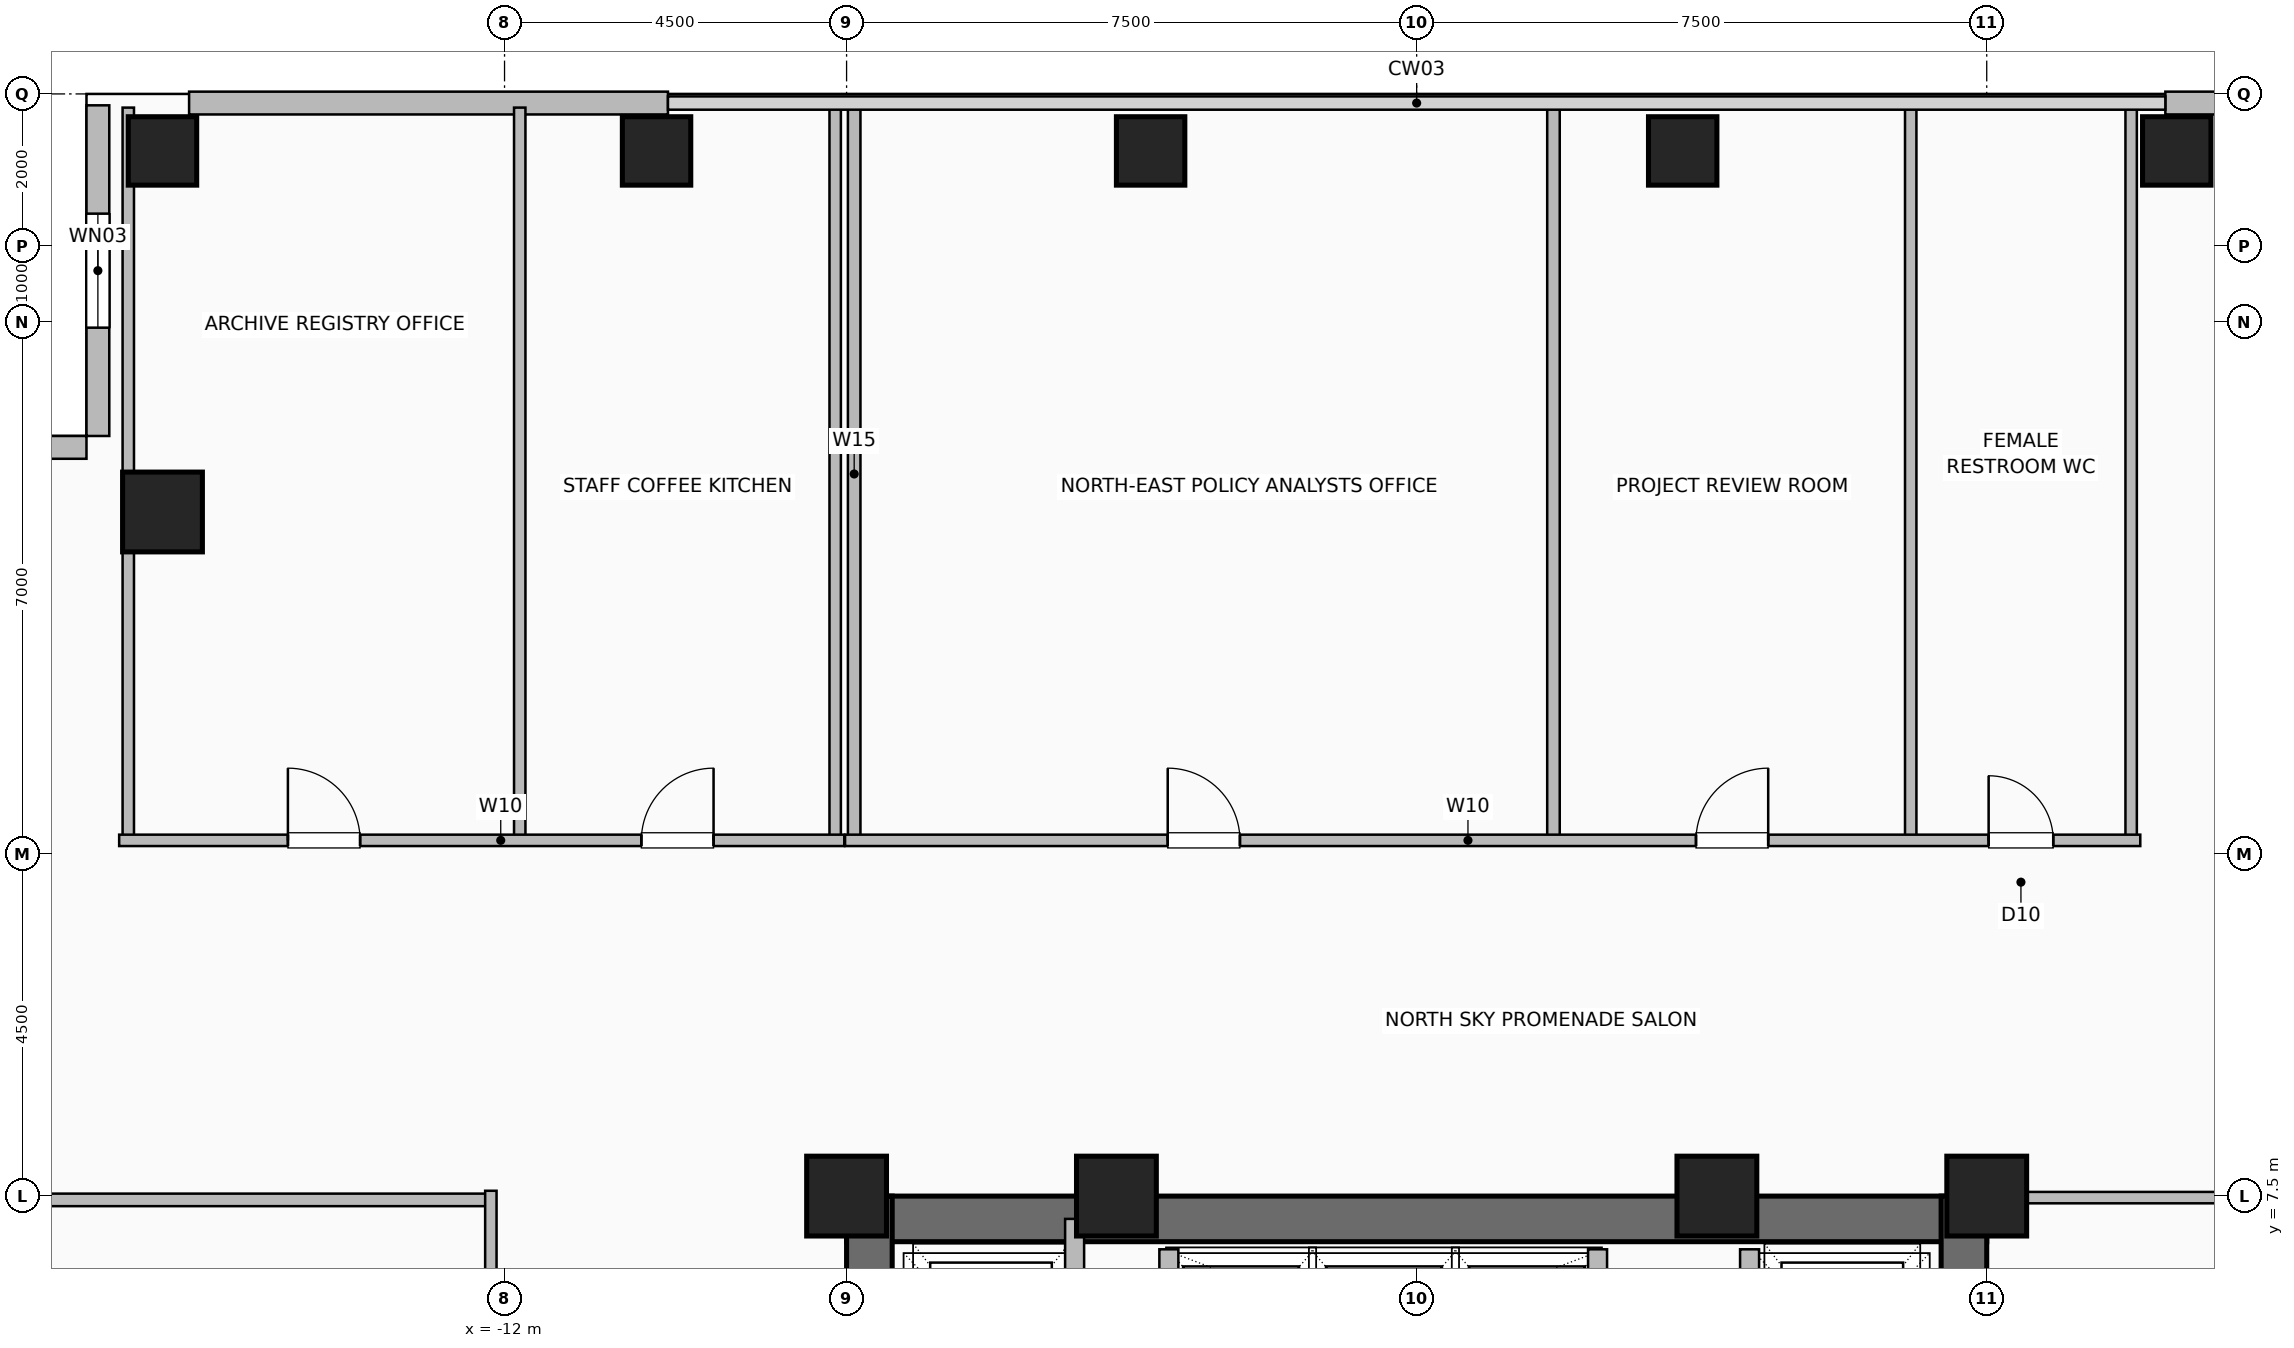
"""IFC4 building model, lengths in metres.
Left out: names, types, materials, properties, quantities, classifications, styles, units other than length and angle.
Written with IfcOpenShell. Run it as: python <this file> out.ifc"""

import sys

from ifc_helpers import new_model, si_unit, direction, frame, frame_2d, origin, origin_2d, place, context, subcontext, project, spatial, rectangle, hollow_rectangle, extrude, element, fill, save


model = new_model("IFC4")
c1 = context("Model", 3, precision=1e-05, world=origin(), true_north=direction((0.0, 1.0)))
c2 = subcontext(c1, "Body", "Model", "MODEL_VIEW")
j1 = project(units=[si_unit("LENGTHUNIT", "METRE"), si_unit("PLANEANGLEUNIT", "RADIAN")], contexts=[c1])
p1 = place(None, origin())
s1 = spatial("IfcSite", under=j1, at=p1, CompositionType="ELEMENT")
p2 = place(p1, origin())
s2 = spatial("IfcBuilding", under=s1, at=p2, CompositionType="ELEMENT")
p3 = place(p2, frame((0.0, 0.0, 112.0)))
s3 = spatial("IfcBuildingStorey", under=s2, at=p3, CompositionType="ELEMENT", Elevation=112.0)
for number, where, z_axis, x_axis in (
    (1, (7.5, 7.5, 0.0), (0.0, 0.0, 1.0), (1.0, 0.0, 0.0)),
    (2, (3.95, 7.5, 0.0), (0.0, 0.0, 1.0), (1.0, 0.0, 0.0)),
    (3, (-3.95, 7.5, 0.0), (0.0, 0.0, 1.0), (1.0, 0.0, 0.0)),
    (4, (-7.5, 7.5, 0.0), (0.0, 0.0, 1.0), (1.0, 0.0, 0.0)),
):
    element("IfcColumn", number, at=place(p3, frame(where, z_axis=z_axis, x_axis=x_axis)), inside=s3, PredefinedType="COLUMN", context=c2, shape_type="SweptSolid", body=[
        extrude(hollow_rectangle(XDim=1.05, YDim=1.05, WallThickness=0.05, at=origin_2d()), origin(), (0.0, 0.0, 1.0), 3.6),
    ])
for number, where, z_axis, x_axis in (
    (5, (-16.5, 21.25, 0.0), (0.0, 0.0, 1.0), (1.0, 0.0, 0.0)),
    (6, (-10.0, 21.25, 0.0), (0.0, 0.0, 1.0), (1.0, 0.0, 0.0)),
    (7, (-3.5, 21.25, 0.0), (0.0, 0.0, 1.0), (1.0, 0.0, 0.0)),
    (8, (3.5, 21.25, 0.0), (0.0, 0.0, 1.0), (1.0, 0.0, 0.0)),
    (9, (10.0, 21.25, 0.0), (0.0, 0.0, 1.0), (1.0, 0.0, 0.0)),
):
    element("IfcColumn", number, at=place(p3, frame(where, z_axis=z_axis, x_axis=x_axis)), inside=s3, PredefinedType="COLUMN", context=c2, shape_type="SweptSolid", body=[
        extrude(hollow_rectangle(XDim=0.9, YDim=0.9, WallThickness=0.045, at=origin_2d()), origin(), (0.0, 0.0, 1.0), 3.6),
    ])
p4 = place(p3, frame((-16.5, 16.5, 0.0), z_axis=(0.0, 0.0, 1.0), x_axis=(1.0, 0.0, 0.0)))
e10 = element("IfcColumn", 10, at=p4, inside=s3, PredefinedType="COLUMN", context=c2, shape_type="SweptSolid", body=[
    extrude(hollow_rectangle(XDim=1.05, YDim=1.05, WallThickness=0.05, at=origin_2d()), origin(), (0.0, 0.0, 1.0), 3.6),
])
for number, where, z_axis, x_axis in (
    (11, (-16.15, 21.88, 0.0), (0.0, 0.0, 1.0), (1.0, 0.0, 0.0)),
    (12, (9.85, 21.88, 0.0), (0.0, 0.0, 1.0), (1.0, 0.0, 0.0)),
):
    element("IfcWall", number, at=place(p3, frame(where, z_axis=z_axis, x_axis=x_axis)), inside=s3, PredefinedType="SOLIDWALL", context=c2, shape_type="SweptSolid", body=[
        extrude(rectangle(XDim=6.3, YDim=0.3, at=frame_2d((3.15, 0.0))), origin(), (0.0, 0.0, 1.0), 3.36),
    ])
p5 = place(p3, frame((-17.35, 21.85, 0.0), z_axis=(0.0, 0.0, 1.0), x_axis=(0.0, -1.0, 0.0)))
e13 = element("IfcWall", 13, at=p5, inside=s3, PredefinedType="SOLIDWALL", context=c2, shape_type="SweptSolid", body=[
    extrude(rectangle(XDim=4.35, YDim=0.3, at=frame_2d((2.175, 0.0))), origin(), (0.0, 0.0, 1.0), 3.36),
])
p6 = place(p5, frame((1.425, 0.0, 0.9)))
e14 = element("IfcOpeningElement", 14, at=p6, cuts=e13, PredefinedType="OPENING", context=c2, shape_type="SweptSolid", body=[
    extrude(rectangle(XDim=1.5, YDim=1.8, at=frame_2d((0.75, 0.9))), frame((0.0, 0.16, 0.0), z_axis=(0.0, -1.0, 0.0), x_axis=(1.0, 0.0, 0.0)), (0.0, 0.0, 1.0), 0.32),
])
p7 = place(p3, frame((-21.85, 17.35, 0.0), z_axis=(0.0, 0.0, 1.0), x_axis=(1.0, 0.0, 0.0)))
e15 = element("IfcWall", 15, at=p7, inside=s3, PredefinedType="SOLIDWALL", context=c2, shape_type="SweptSolid", body=[
    extrude(rectangle(XDim=4.35, YDim=0.3, at=frame_2d((2.175, 0.0))), origin(), (0.0, 0.0, 1.0), 3.36),
])
p8 = place(p3, frame((-7.5, 7.2, 0.0), z_axis=(0.0, 0.0, 1.0), x_axis=(1.0, 0.0, 0.0)))
e16 = element("IfcWall", 16, at=p8, inside=s3, PredefinedType="SHEAR", context=c2, shape_type="SweptSolid", body=[
    extrude(rectangle(XDim=15.0, YDim=0.6, at=frame_2d((7.5, 0.0))), origin(), (0.0, 0.0, 1.0), 3.36),
])
p9 = place(p3, frame((-7.2, -7.5, 0.0), z_axis=(0.0, 0.0, 1.0), x_axis=(0.0, 1.0, 0.0)))
e17 = element("IfcWall", 17, at=p9, inside=s3, PredefinedType="SHEAR", context=c2, shape_type="SweptSolid", body=[
    extrude(rectangle(XDim=15.0, YDim=0.6, at=frame_2d((7.5, 0.0))), origin(), (0.0, 0.0, 1.0), 3.36),
])
p10 = place(p9, frame((9.5, 0.0, 0.0)))
e18 = element("IfcOpeningElement", 18, at=p10, cuts=e17, PredefinedType="OPENING", context=c2, shape_type="SweptSolid", body=[
    extrude(rectangle(XDim=1.0, YDim=2.08, at=frame_2d((0.5, 1.04))), frame((0.0, 0.31, 0.0), z_axis=(0.0, -1.0, 0.0), x_axis=(1.0, 0.0, 0.0)), (0.0, 0.0, 1.0), 0.62),
])
p11 = place(p3, frame((7.2, -7.5, 0.0), z_axis=(0.0, 0.0, 1.0), x_axis=(0.0, 1.0, 0.0)))
e19 = element("IfcWall", 19, at=p11, inside=s3, PredefinedType="SHEAR", context=c2, shape_type="SweptSolid", body=[
    extrude(rectangle(XDim=15.0, YDim=0.6, at=frame_2d((7.5, 0.0))), origin(), (0.0, 0.0, 1.0), 3.36),
])
for number, where, z_axis, x_axis in (
    (20, (-3.26, 4.58, 0.0), (0.0, 0.0, 1.0), (0.0, 1.0, 0.0)),
    (21, (2.38, 4.58, 0.0), (0.0, 0.0, 1.0), (0.0, 1.0, 0.0)),
):
    element("IfcWall", number, at=place(p3, frame(where, z_axis=z_axis, x_axis=x_axis)), inside=s3, PredefinedType="SHEAR", context=c2, shape_type="SweptSolid", body=[
        extrude(rectangle(XDim=2.22, YDim=0.25, at=frame_2d((1.11, 0.0))), origin(), (0.0, 0.0, 1.0), 3.36),
    ])
p12 = place(p3, frame((-4.5, 4.35, 0.0), z_axis=(0.0, 0.0, 1.0), x_axis=(0.0, 1.0, 0.0)))
e22 = element("IfcWall", 22, at=p12, inside=s3, PredefinedType="SHEAR", context=c2, shape_type="SweptSolid", body=[
    extrude(rectangle(XDim=2.85, YDim=0.25, at=frame_2d((1.425, 0.0))), origin(), (0.0, 0.0, 1.0), 3.36),
])
p13 = place(p3, frame((4.38, 4.3, 0.0), z_axis=(0.0, 0.0, 1.0), x_axis=(0.0, 1.0, 0.0)))
e23 = element("IfcWall", 23, at=p13, inside=s3, PredefinedType="SHEAR", context=c2, shape_type="SweptSolid", body=[
    extrude(rectangle(XDim=2.5, YDim=0.25, at=frame_2d((1.25, 0.0))), origin(), (0.0, 0.0, 1.0), 3.36),
])
p14 = place(p13, frame((0.8, 0.0, 0.0)))
e24 = element("IfcOpeningElement", 24, at=p14, cuts=e23, PredefinedType="OPENING", context=c2, shape_type="SweptSolid", body=[
    extrude(rectangle(XDim=1.2, YDim=2.2, at=frame_2d((0.6, 1.1))), frame((0.0, 0.135, 0.0), z_axis=(0.0, -1.0, 0.0), x_axis=(1.0, 0.0, 0.0)), (0.0, 0.0, 1.0), 0.27),
])
p15 = place(p3, frame((-21.82, 7.45, 0.0), z_axis=(0.0, 0.0, 1.0), x_axis=(1.0, 0.0, 0.0)))
e25 = element("IfcWall", 25, at=p15, inside=s3, PredefinedType="PLUMBINGWALL", context=c2, shape_type="SweptSolid", body=[
    extrude(rectangle(XDim=9.64, YDim=0.165, at=frame_2d((4.82, 0.0))), origin(), (0.0, 0.0, 1.0), 3.36),
])
p16 = place(p3, frame((-12.18, -7.57, 0.0), z_axis=(0.0, 0.0, 1.0), x_axis=(0.0, 1.0, 0.0)))
e26 = element("IfcWall", 26, at=p16, inside=s3, PredefinedType="PARTITIONING", context=c2, shape_type="SweptSolid", body=[
    extrude(rectangle(XDim=15.14, YDim=0.15, at=frame_2d((7.57, 0.0))), origin(), (0.0, 0.0, 1.0), 3.36),
])
p17 = place(p16, frame((7.095, 0.0, 0.0)))
e27 = element("IfcOpeningElement", 27, at=p17, cuts=e26, PredefinedType="OPENING", context=c2, shape_type="SweptSolid", body=[
    extrude(rectangle(XDim=0.95, YDim=2.06, at=frame_2d((0.475, 1.03))), frame((0.0, 0.085, 0.0), z_axis=(0.0, -1.0, 0.0), x_axis=(1.0, 0.0, 0.0)), (0.0, 0.0, 1.0), 0.17),
])
for number, where, z_axis, x_axis in (
    (28, (-16.95, 12.18, 0.0), (0.0, 0.0, 1.0), (0.0, 1.0, 0.0)),
    (29, (-11.8, 12.18, 0.0), (0.0, 0.0, 1.0), (0.0, 1.0, 0.0)),
    (30, (-7.65, 12.18, 0.0), (0.0, 0.0, 1.0), (0.0, 1.0, 0.0)),
):
    element("IfcWall", number, at=place(p3, frame(where, z_axis=z_axis, x_axis=x_axis)), inside=s3, PredefinedType="PARTITIONING", context=c2, shape_type="SweptSolid", body=[
        extrude(rectangle(XDim=9.64, YDim=0.15, at=frame_2d((4.82, 0.0))), origin(), (0.0, 0.0, 1.0), 3.36),
    ])
p18 = place(p3, frame((-17.07, 12.18, 0.0), z_axis=(0.0, 0.0, 1.0), x_axis=(1.0, 0.0, 0.0)))
e31 = element("IfcWall", 31, at=p18, inside=s3, PredefinedType="PARTITIONING", context=c2, shape_type="SweptSolid", body=[
    extrude(rectangle(XDim=9.54, YDim=0.15, at=frame_2d((4.77, 0.0))), origin(), (0.0, 0.0, 1.0), 3.36),
])
p19 = place(p18, frame((2.22, 0.0, 0.0)))
e32 = element("IfcOpeningElement", 32, at=p19, cuts=e31, PredefinedType="OPENING", context=c2, shape_type="SweptSolid", body=[
    extrude(rectangle(XDim=0.95, YDim=2.06, at=frame_2d((0.475, 1.03))), frame((0.0, 0.085, 0.0), z_axis=(0.0, -1.0, 0.0), x_axis=(1.0, 0.0, 0.0)), (0.0, 0.0, 1.0), 0.17),
])
p20 = place(p18, frame((6.87, 0.0, 0.0)))
e33 = element("IfcOpeningElement", 33, at=p20, cuts=e31, PredefinedType="OPENING", context=c2, shape_type="SweptSolid", body=[
    extrude(rectangle(XDim=0.95, YDim=2.06, at=frame_2d((0.475, 1.03))), frame((0.0, 0.085, 0.0), z_axis=(0.0, -1.0, 0.0), x_axis=(1.0, 0.0, 0.0)), (0.0, 0.0, 1.0), 0.17),
])
for number, where, z_axis, x_axis in (
    (34, (-7.4, 12.18, 0.0), (0.0, 0.0, 1.0), (0.0, 1.0, 0.0)),
    (35, (1.8, 12.18, 0.0), (0.0, 0.0, 1.0), (0.0, 1.0, 0.0)),
):
    element("IfcWall", number, at=place(p3, frame(where, z_axis=z_axis, x_axis=x_axis)), inside=s3, PredefinedType="PLUMBINGWALL", context=c2, shape_type="SweptSolid", body=[
        extrude(rectangle(XDim=9.64, YDim=0.165, at=frame_2d((4.82, 0.0))), origin(), (0.0, 0.0, 1.0), 3.36),
    ])
for number, where, z_axis, x_axis in (
    (36, (6.5, 12.18, 0.0), (0.0, 0.0, 1.0), (0.0, 1.0, 0.0)),
    (37, (9.4, 12.18, 0.0), (0.0, 0.0, 1.0), (0.0, 1.0, 0.0)),
):
    element("IfcWall", number, at=place(p3, frame(where, z_axis=z_axis, x_axis=x_axis)), inside=s3, PredefinedType="PARTITIONING", context=c2, shape_type="SweptSolid", body=[
        extrude(rectangle(XDim=9.64, YDim=0.15, at=frame_2d((4.82, 0.0))), origin(), (0.0, 0.0, 1.0), 3.36),
    ])
p21 = place(p3, frame((-7.52, 12.18, 0.0), z_axis=(0.0, 0.0, 1.0), x_axis=(1.0, 0.0, 0.0)))
e38 = element("IfcWall", 38, at=p21, inside=s3, PredefinedType="PARTITIONING", context=c2, shape_type="SweptSolid", body=[
    extrude(rectangle(XDim=17.04, YDim=0.15, at=frame_2d((8.52, 0.0))), origin(), (0.0, 0.0, 1.0), 3.36),
])
p22 = place(p21, frame((4.245, 0.0, 0.0)))
e39 = element("IfcOpeningElement", 39, at=p22, cuts=e38, PredefinedType="OPENING", context=c2, shape_type="SweptSolid", body=[
    extrude(rectangle(XDim=0.95, YDim=2.06, at=frame_2d((0.475, 1.03))), frame((0.0, 0.085, 0.0), z_axis=(0.0, -1.0, 0.0), x_axis=(1.0, 0.0, 0.0)), (0.0, 0.0, 1.0), 0.17),
])
p23 = place(p21, frame((11.195, 0.0, 0.0)))
e40 = element("IfcOpeningElement", 40, at=p23, cuts=e38, PredefinedType="OPENING", context=c2, shape_type="SweptSolid", body=[
    extrude(rectangle(XDim=0.95, YDim=2.06, at=frame_2d((0.475, 1.03))), frame((0.0, 0.085, 0.0), z_axis=(0.0, -1.0, 0.0), x_axis=(1.0, 0.0, 0.0)), (0.0, 0.0, 1.0), 0.17),
])
p24 = place(p21, frame((15.045, 0.0, 0.0)))
e41 = element("IfcOpeningElement", 41, at=p24, cuts=e38, PredefinedType="OPENING", context=c2, shape_type="SweptSolid", body=[
    extrude(rectangle(XDim=0.85, YDim=2.05, at=frame_2d((0.425, 1.025))), frame((0.0, 0.085, 0.0), z_axis=(0.0, -1.0, 0.0), x_axis=(1.0, 0.0, 0.0)), (0.0, 0.0, 1.0), 0.17),
])
p25 = place(p3, frame((7.6, 7.48, 0.0), z_axis=(0.0, 0.0, 1.0), x_axis=(1.0, 0.0, 0.0)))
e42 = element("IfcWall", 42, at=p25, inside=s3, PredefinedType="PARTITIONING", context=c2, shape_type="SweptSolid", body=[
    extrude(rectangle(XDim=14.22, YDim=0.15, at=frame_2d((7.11, 0.0))), origin(), (0.0, 0.0, 1.0), 3.36),
])
p26 = place(p6, origin())
e43 = element("IfcWindow", 43, at=p26, inside=s3, PartitioningType="SINGLE_PANEL", PredefinedType="WINDOW", context=c2, shape_type="SweptSolid", body=[
    extrude(rectangle(XDim=1.5, YDim=1.8, at=frame_2d((0.75, 0.9))), frame((0.0, 0.03, 0.0), z_axis=(0.0, -1.0, 0.0), x_axis=(1.0, 0.0, 0.0)), (0.0, 0.0, 1.0), 0.06),
])
fill(e14, e43)
p27 = place(p19, origin())
e44 = element("IfcDoor", 44, at=p27, inside=s3, OperationType="SINGLE_SWING_LEFT", PredefinedType="DOOR", context=c2, shape_type="SweptSolid", body=[
    extrude(rectangle(XDim=0.95, YDim=2.06, at=frame_2d((0.475, 1.03))), frame((0.0, 0.025, 0.0), z_axis=(0.0, -1.0, 0.0), x_axis=(1.0, 0.0, 0.0)), (0.0, 0.0, 1.0), 0.05),
])
fill(e32, e44)
p28 = place(p20, origin())
e45 = element("IfcDoor", 45, at=p28, inside=s3, OperationType="SINGLE_SWING_RIGHT", PredefinedType="DOOR", context=c2, shape_type="SweptSolid", body=[
    extrude(rectangle(XDim=0.95, YDim=2.06, at=frame_2d((0.475, 1.03))), frame((0.0, 0.025, 0.0), z_axis=(0.0, -1.0, 0.0), x_axis=(1.0, 0.0, 0.0)), (0.0, 0.0, 1.0), 0.05),
])
fill(e33, e45)
p29 = place(p22, origin())
e46 = element("IfcDoor", 46, at=p29, inside=s3, OperationType="SINGLE_SWING_LEFT", PredefinedType="DOOR", context=c2, shape_type="SweptSolid", body=[
    extrude(rectangle(XDim=0.95, YDim=2.06, at=frame_2d((0.475, 1.03))), frame((0.0, 0.025, 0.0), z_axis=(0.0, -1.0, 0.0), x_axis=(1.0, 0.0, 0.0)), (0.0, 0.0, 1.0), 0.05),
])
fill(e39, e46)
p30 = place(p23, origin())
e47 = element("IfcDoor", 47, at=p30, inside=s3, OperationType="SINGLE_SWING_RIGHT", PredefinedType="DOOR", context=c2, shape_type="SweptSolid", body=[
    extrude(rectangle(XDim=0.95, YDim=2.06, at=frame_2d((0.475, 1.03))), frame((0.0, 0.025, 0.0), z_axis=(0.0, -1.0, 0.0), x_axis=(1.0, 0.0, 0.0)), (0.0, 0.0, 1.0), 0.05),
])
fill(e40, e47)
p31 = place(p24, origin())
e48 = element("IfcDoor", 48, at=p31, inside=s3, OperationType="SINGLE_SWING_LEFT", PredefinedType="DOOR", context=c2, shape_type="SweptSolid", body=[
    extrude(rectangle(XDim=0.85, YDim=2.05, at=frame_2d((0.425, 1.025))), frame((0.0, 0.025, 0.0), z_axis=(0.0, -1.0, 0.0), x_axis=(1.0, 0.0, 0.0)), (0.0, 0.0, 1.0), 0.05),
])
fill(e41, e48)
save(model, sys.argv[1])
